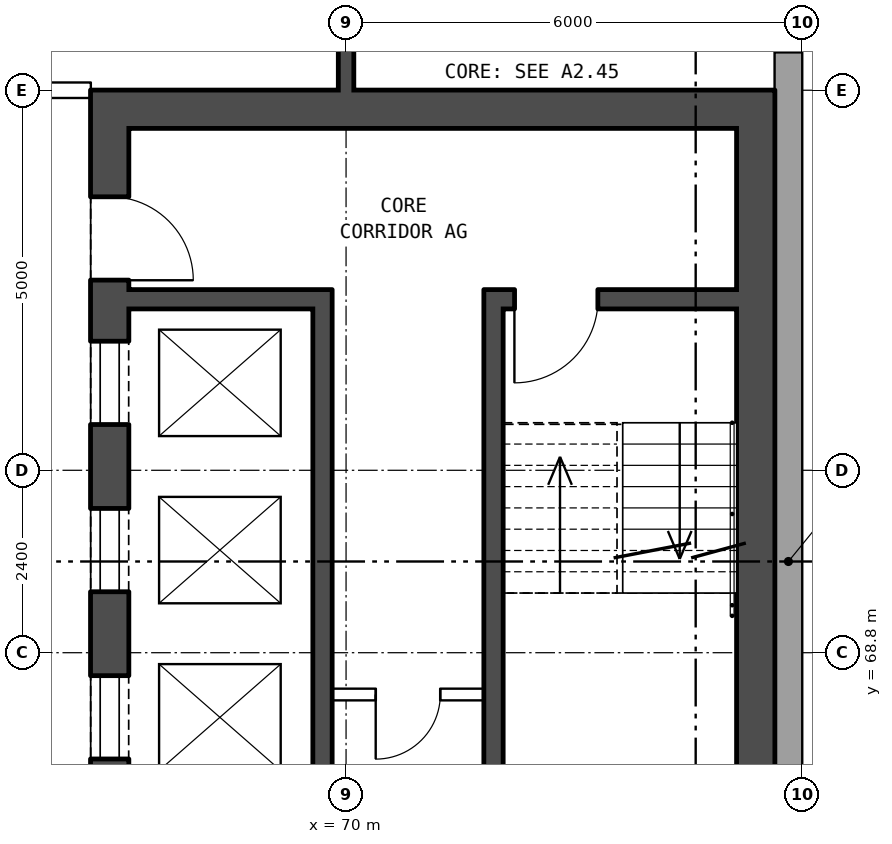
"""IFC4 building model, lengths in metres.
Left out: names, types, materials, properties, quantities, classifications, styles, units other than length and angle.
Written with IfcOpenShell. Run it as: python <this file> out.ifc"""

import sys

from ifc_helpers import new_model, si_unit, direction, frame, frame_2d, origin, place, context, subcontext, project, spatial, rectangle, extrude, element, fill, save


model = new_model("IFC4")
c1 = context("Model", 3, precision=1e-05, world=origin(), true_north=direction((0.0, 1.0)))
c2 = subcontext(c1, "Body", "Model", "MODEL_VIEW")
j1 = project(units=[si_unit("LENGTHUNIT", "METRE"), si_unit("PLANEANGLEUNIT", "RADIAN")], contexts=[c1])
p1 = place(None, origin())
s1 = spatial("IfcSite", under=j1, at=p1, CompositionType="ELEMENT")
p2 = place(p1, origin())
s2 = spatial("IfcBuilding", under=s1, at=p2, CompositionType="ELEMENT")
p3 = place(p2, frame((0.0, 0.0, 157.8)))
s3 = spatial("IfcBuildingStorey", under=s2, at=p3, CompositionType="ELEMENT", Elevation=157.8)
p4 = place(p3, frame((75.82, 57.075, 0.0), z_axis=(0.0, 0.0, 1.0), x_axis=(0.0, 1.0, 0.0)))
e1 = element("IfcWall", 1, at=p4, inside=s3, PredefinedType="STANDARD", context=c2, shape_type="SweptSolid", body=[
    extrude(rectangle(XDim=25.851, YDim=0.36, at=frame_2d((12.925, 0.0))), origin(), (0.0, 0.0, 1.0), 2.85),
])
p5 = place(p4, frame((1.625, 0.0, 0.8)))
e2 = element("IfcOpeningElement", 2, at=p5, cuts=e1, PredefinedType="OPENING", context=c2, shape_type="SweptSolid", body=[
    extrude(rectangle(XDim=1.6, YDim=1.8, at=frame_2d((0.8, 0.9))), frame((0.0, 0.19, 0.0), z_axis=(0.0, -1.0, 0.0), x_axis=(1.0, 0.0, 0.0)), (0.0, 0.0, 1.0), 0.38),
])
p6 = place(p4, frame((4.625, 0.0, 0.8)))
e3 = element("IfcOpeningElement", 3, at=p6, cuts=e1, PredefinedType="OPENING", context=c2, shape_type="SweptSolid", body=[
    extrude(rectangle(XDim=1.6, YDim=1.8, at=frame_2d((0.8, 0.9))), frame((0.0, 0.19, 0.0), z_axis=(0.0, -1.0, 0.0), x_axis=(1.0, 0.0, 0.0)), (0.0, 0.0, 1.0), 0.38),
])
p7 = place(p4, frame((19.625, 0.0, 0.8)))
e4 = element("IfcOpeningElement", 4, at=p7, cuts=e1, PredefinedType="OPENING", context=c2, shape_type="SweptSolid", body=[
    extrude(rectangle(XDim=1.6, YDim=1.8, at=frame_2d((0.8, 0.9))), frame((0.0, 0.19, 0.0), z_axis=(0.0, -1.0, 0.0), x_axis=(1.0, 0.0, 0.0)), (0.0, 0.0, 1.0), 0.38),
])
p8 = place(p4, frame((22.625, 0.0, 0.8)))
e5 = element("IfcOpeningElement", 5, at=p8, cuts=e1, PredefinedType="OPENING", context=c2, shape_type="SweptSolid", body=[
    extrude(rectangle(XDim=1.6, YDim=1.8, at=frame_2d((0.8, 0.9))), frame((0.0, 0.19, 0.0), z_axis=(0.0, -1.0, 0.0), x_axis=(1.0, 0.0, 0.0)), (0.0, 0.0, 1.0), 0.38),
])
p9 = place(p3, frame((66.89, 63.8, 0.0), z_axis=(0.0, 0.0, 1.0), x_axis=(0.0, 1.0, 0.0)))
e6 = element("IfcWall", 6, at=p9, inside=s3, PredefinedType="SHEAR", context=c2, shape_type="SweptSolid", body=[
    extrude(rectangle(XDim=12.4, YDim=0.5, at=frame_2d((6.2, 0.0))), origin(), (0.0, 0.0, 1.0), 2.85),
])
p10 = place(p9, frame((1.325, 0.0, 0.0)))
e7 = element("IfcOpeningElement", 7, at=p10, cuts=e6, PredefinedType="OPENING", context=c2, shape_type="SweptSolid", body=[
    extrude(rectangle(XDim=1.1, YDim=2.1, at=frame_2d((0.55, 1.05))), frame((0.0, 0.26, 0.0), z_axis=(0.0, -1.0, 0.0), x_axis=(1.0, 0.0, 0.0)), (0.0, 0.0, 1.0), 0.52),
])
p11 = place(p9, frame((3.6, 0.0, 0.0)))
e8 = element("IfcOpeningElement", 8, at=p11, cuts=e6, PredefinedType="OPENING", context=c2, shape_type="SweptSolid", body=[
    extrude(rectangle(XDim=1.1, YDim=2.1, at=frame_2d((0.55, 1.05))), frame((0.0, 0.26, 0.0), z_axis=(0.0, -1.0, 0.0), x_axis=(1.0, 0.0, 0.0)), (0.0, 0.0, 1.0), 0.52),
])
p12 = place(p9, frame((5.8, 0.0, 0.0)))
e9 = element("IfcOpeningElement", 9, at=p12, cuts=e6, PredefinedType="OPENING", context=c2, shape_type="SweptSolid", body=[
    extrude(rectangle(XDim=1.1, YDim=2.1, at=frame_2d((0.55, 1.05))), frame((0.0, 0.26, 0.0), z_axis=(0.0, -1.0, 0.0), x_axis=(1.0, 0.0, 0.0)), (0.0, 0.0, 1.0), 0.52),
])
p13 = place(p9, frame((8.0, 0.0, 0.0)))
e10 = element("IfcOpeningElement", 10, at=p13, cuts=e6, PredefinedType="OPENING", context=c2, shape_type="SweptSolid", body=[
    extrude(rectangle(XDim=1.1, YDim=2.1, at=frame_2d((0.55, 1.05))), frame((0.0, 0.26, 0.0), z_axis=(0.0, -1.0, 0.0), x_axis=(1.0, 0.0, 0.0)), (0.0, 0.0, 1.0), 0.52),
])
p14 = place(p9, frame((9.9, 0.0, 0.0)))
e11 = element("IfcOpeningElement", 11, at=p14, cuts=e6, PredefinedType="OPENING", context=c2, shape_type="SweptSolid", body=[
    extrude(rectangle(XDim=1.1, YDim=2.1, at=frame_2d((0.55, 1.05))), frame((0.0, 0.26, 0.0), z_axis=(0.0, -1.0, 0.0), x_axis=(1.0, 0.0, 0.0)), (0.0, 0.0, 1.0), 0.52),
])
p15 = place(p3, frame((75.39, 63.8, 0.0), z_axis=(0.0, 0.0, 1.0), x_axis=(0.0, 1.0, 0.0)))
e12 = element("IfcWall", 12, at=p15, inside=s3, PredefinedType="SHEAR", context=c2, shape_type="SweptSolid", body=[
    extrude(rectangle(XDim=12.4, YDim=0.5, at=frame_2d((6.2, 0.0))), origin(), (0.0, 0.0, 1.0), 2.85),
])
p16 = place(p3, frame((67.14, 75.95, 0.0), z_axis=(0.0, 0.0, 1.0), x_axis=(1.0, 0.0, 0.0)))
e13 = element("IfcWall", 13, at=p16, inside=s3, PredefinedType="SHEAR", context=c2, shape_type="SweptSolid", body=[
    extrude(rectangle(XDim=8.0, YDim=0.5, at=frame_2d((4.0, 0.0))), origin(), (0.0, 0.0, 1.0), 2.85),
])
p17 = place(p3, frame((69.815, 68.25, 0.0), z_axis=(0.0, 0.0, 1.0), x_axis=(1.0, 0.0, 0.0)))
e14 = element("IfcWall", 14, at=p17, inside=s3, PredefinedType="PARTITIONING", context=c2, shape_type="SweptSolid", body=[
    extrude(rectangle(XDim=2.0, YDim=0.15, at=frame_2d((1.0, 0.0))), origin(), (0.0, 0.0, 1.0), 2.85),
])
p18 = place(p17, frame((0.575, 0.0, 0.0)))
e15 = element("IfcOpeningElement", 15, at=p18, cuts=e14, PredefinedType="OPENING", context=c2, shape_type="SweptSolid", body=[
    extrude(rectangle(XDim=0.85, YDim=2.1, at=frame_2d((0.425, 1.05))), frame((0.0, 0.085, 0.0), z_axis=(0.0, -1.0, 0.0), x_axis=(1.0, 0.0, 0.0)), (0.0, 0.0, 1.0), 0.17),
])
p19 = place(p3, frame((67.14, 73.45, 0.0), z_axis=(0.0, 0.0, 1.0), x_axis=(1.0, 0.0, 0.0)))
e16 = element("IfcWall", 16, at=p19, inside=s3, PredefinedType="SHEAR", context=c2, shape_type="SweptSolid", body=[
    extrude(rectangle(XDim=2.425, YDim=0.25, at=frame_2d((1.212, 0.0))), origin(), (0.0, 0.0, 1.0), 2.85),
])
p20 = place(p3, frame((72.065, 73.45, 0.0), z_axis=(0.0, 0.0, 1.0), x_axis=(1.0, 0.0, 0.0)))
e17 = element("IfcWall", 17, at=p20, inside=s3, PredefinedType="SHEAR", context=c2, shape_type="SweptSolid", body=[
    extrude(rectangle(XDim=3.075, YDim=0.25, at=frame_2d((1.538, 0.0))), origin(), (0.0, 0.0, 1.0), 2.85),
])
p21 = place(p20, frame((0.15, 0.0, 0.0)))
e18 = element("IfcOpeningElement", 18, at=p21, cuts=e17, PredefinedType="OPENING", context=c2, shape_type="SweptSolid", body=[
    extrude(rectangle(XDim=1.1, YDim=2.1, at=frame_2d((0.55, 1.05))), frame((0.0, 0.135, 0.0), z_axis=(0.0, -1.0, 0.0), x_axis=(1.0, 0.0, 0.0)), (0.0, 0.0, 1.0), 0.27),
])
p22 = place(p3, frame((69.69, 66.975, 0.0), z_axis=(0.0, 0.0, 1.0), x_axis=(0.0, 1.0, 0.0)))
e19 = element("IfcWall", 19, at=p22, inside=s3, PredefinedType="SHEAR", context=c2, shape_type="SweptSolid", body=[
    extrude(rectangle(XDim=6.6, YDim=0.25, at=frame_2d((3.3, 0.0))), origin(), (0.0, 0.0, 1.0), 2.85),
])
p23 = place(p3, frame((71.94, 66.225, 0.0), z_axis=(0.0, 0.0, 1.0), x_axis=(0.0, 1.0, 0.0)))
e20 = element("IfcWall", 20, at=p23, inside=s3, PredefinedType="SHEAR", context=c2, shape_type="SweptSolid", body=[
    extrude(rectangle(XDim=7.35, YDim=0.25, at=frame_2d((3.675, 0.0))), origin(), (0.0, 0.0, 1.0), 2.85),
])
p24 = place(p3, frame((63.64, 76.2, 0.0), z_axis=(0.0, 0.0, 1.0), x_axis=(1.0, 0.0, 0.0)))
e21 = element("IfcWall", 21, at=p24, inside=s3, PredefinedType="PARTITIONING", context=c2, shape_type="SweptSolid", body=[
    extrude(rectangle(XDim=3.0, YDim=0.2, at=frame_2d((1.5, 0.0))), origin(), (0.0, 0.0, 1.0), 2.85),
])
p25 = place(p24, frame((1.18, 0.0, 0.0)))
e22 = element("IfcOpeningElement", 22, at=p25, cuts=e21, PredefinedType="OPENING", context=c2, shape_type="SweptSolid", body=[
    extrude(rectangle(XDim=1.0, YDim=2.1, at=frame_2d((0.5, 1.05))), frame((0.0, 0.11, 0.0), z_axis=(0.0, -1.0, 0.0), x_axis=(1.0, 0.0, 0.0)), (0.0, 0.0, 1.0), 0.22),
])
p26 = place(p3, frame((70.0, 76.2, 0.0), z_axis=(0.0, 0.0, 1.0), x_axis=(0.0, 1.0, 0.0)))
e23 = element("IfcWall", 23, at=p26, inside=s3, PredefinedType="SOLIDWALL", context=c2, shape_type="SweptSolid", body=[
    extrude(rectangle(XDim=9.44, YDim=0.2, at=frame_2d((4.72, 0.0))), origin(), (0.0, 0.0, 1.0), 2.85),
])
p27 = place(p26, frame((1.5, 0.0, 0.0)))
e24 = element("IfcOpeningElement", 24, at=p27, cuts=e23, PredefinedType="OPENING", context=c2, shape_type="SweptSolid", body=[
    extrude(rectangle(XDim=0.9, YDim=2.1, at=frame_2d((0.45, 1.05))), frame((0.0, 0.11, 0.0), z_axis=(0.0, -1.0, 0.0), x_axis=(1.0, 0.0, 0.0)), (0.0, 0.0, 1.0), 0.22),
])
p28 = place(p11, origin())
e25 = element("IfcDoor", 25, at=p28, inside=s3, OperationType="DOUBLE_DOOR_SLIDING", PredefinedType="DOOR", context=c2, shape_type="SweptSolid", body=[
    extrude(rectangle(XDim=1.1, YDim=2.1, at=frame_2d((0.55, 1.05))), frame((0.0, -0.185, 0.0), z_axis=(0.0, -1.0, 0.0), x_axis=(1.0, 0.0, 0.0)), (0.0, 0.0, 1.0), 0.05),
])
fill(e8, e25)
p29 = place(p12, origin())
e26 = element("IfcDoor", 26, at=p29, inside=s3, OperationType="DOUBLE_DOOR_SLIDING", PredefinedType="DOOR", context=c2, shape_type="SweptSolid", body=[
    extrude(rectangle(XDim=1.1, YDim=2.1, at=frame_2d((0.55, 1.05))), frame((0.0, -0.185, 0.0), z_axis=(0.0, -1.0, 0.0), x_axis=(1.0, 0.0, 0.0)), (0.0, 0.0, 1.0), 0.05),
])
fill(e9, e26)
p30 = place(p13, origin())
e27 = element("IfcDoor", 27, at=p30, inside=s3, OperationType="DOUBLE_DOOR_SLIDING", PredefinedType="DOOR", context=c2, shape_type="SweptSolid", body=[
    extrude(rectangle(XDim=1.1, YDim=2.1, at=frame_2d((0.55, 1.05))), frame((0.0, -0.185, 0.0), z_axis=(0.0, -1.0, 0.0), x_axis=(1.0, 0.0, 0.0)), (0.0, 0.0, 1.0), 0.05),
])
fill(e10, e27)
p31 = place(p14, frame((1.1, 0.0, 0.0), z_axis=(0.0, 0.0, 1.0), x_axis=(-1.0, 0.0, 0.0)))
e28 = element("IfcDoor", 28, at=p31, inside=s3, OperationType="SINGLE_SWING_RIGHT", PredefinedType="DOOR", context=c2, shape_type="SweptSolid", body=[
    extrude(rectangle(XDim=1.1, YDim=2.1, at=frame_2d((0.55, 1.05))), frame((0.0, 0.235, 0.0), z_axis=(0.0, -1.0, 0.0), x_axis=(1.0, 0.0, 0.0)), (0.0, 0.0, 1.0), 0.05),
])
fill(e11, e28)
p32 = place(p21, frame((1.1, 0.0, 0.0), z_axis=(0.0, 0.0, 1.0), x_axis=(-1.0, 0.0, 0.0)))
e29 = element("IfcDoor", 29, at=p32, inside=s3, OperationType="SINGLE_SWING_RIGHT", PredefinedType="DOOR", context=c2, shape_type="SweptSolid", body=[
    extrude(rectangle(XDim=1.1, YDim=2.1, at=frame_2d((0.55, 1.05))), frame((0.0, 0.025, 0.0), z_axis=(0.0, -1.0, 0.0), x_axis=(1.0, 0.0, 0.0)), (0.0, 0.0, 1.0), 0.05),
])
fill(e18, e29)
p33 = place(p18, frame((0.85, 0.0, 0.0), z_axis=(0.0, 0.0, 1.0), x_axis=(-1.0, 0.0, 0.0)))
e30 = element("IfcDoor", 30, at=p33, inside=s3, OperationType="SINGLE_SWING_RIGHT", PredefinedType="DOOR", context=c2, shape_type="SweptSolid", body=[
    extrude(rectangle(XDim=0.85, YDim=2.1, at=frame_2d((0.425, 1.05))), frame((0.0, 0.025, 0.0), z_axis=(0.0, -1.0, 0.0), x_axis=(1.0, 0.0, 0.0)), (0.0, 0.0, 1.0), 0.05),
])
fill(e15, e30)
save(model, sys.argv[1])
